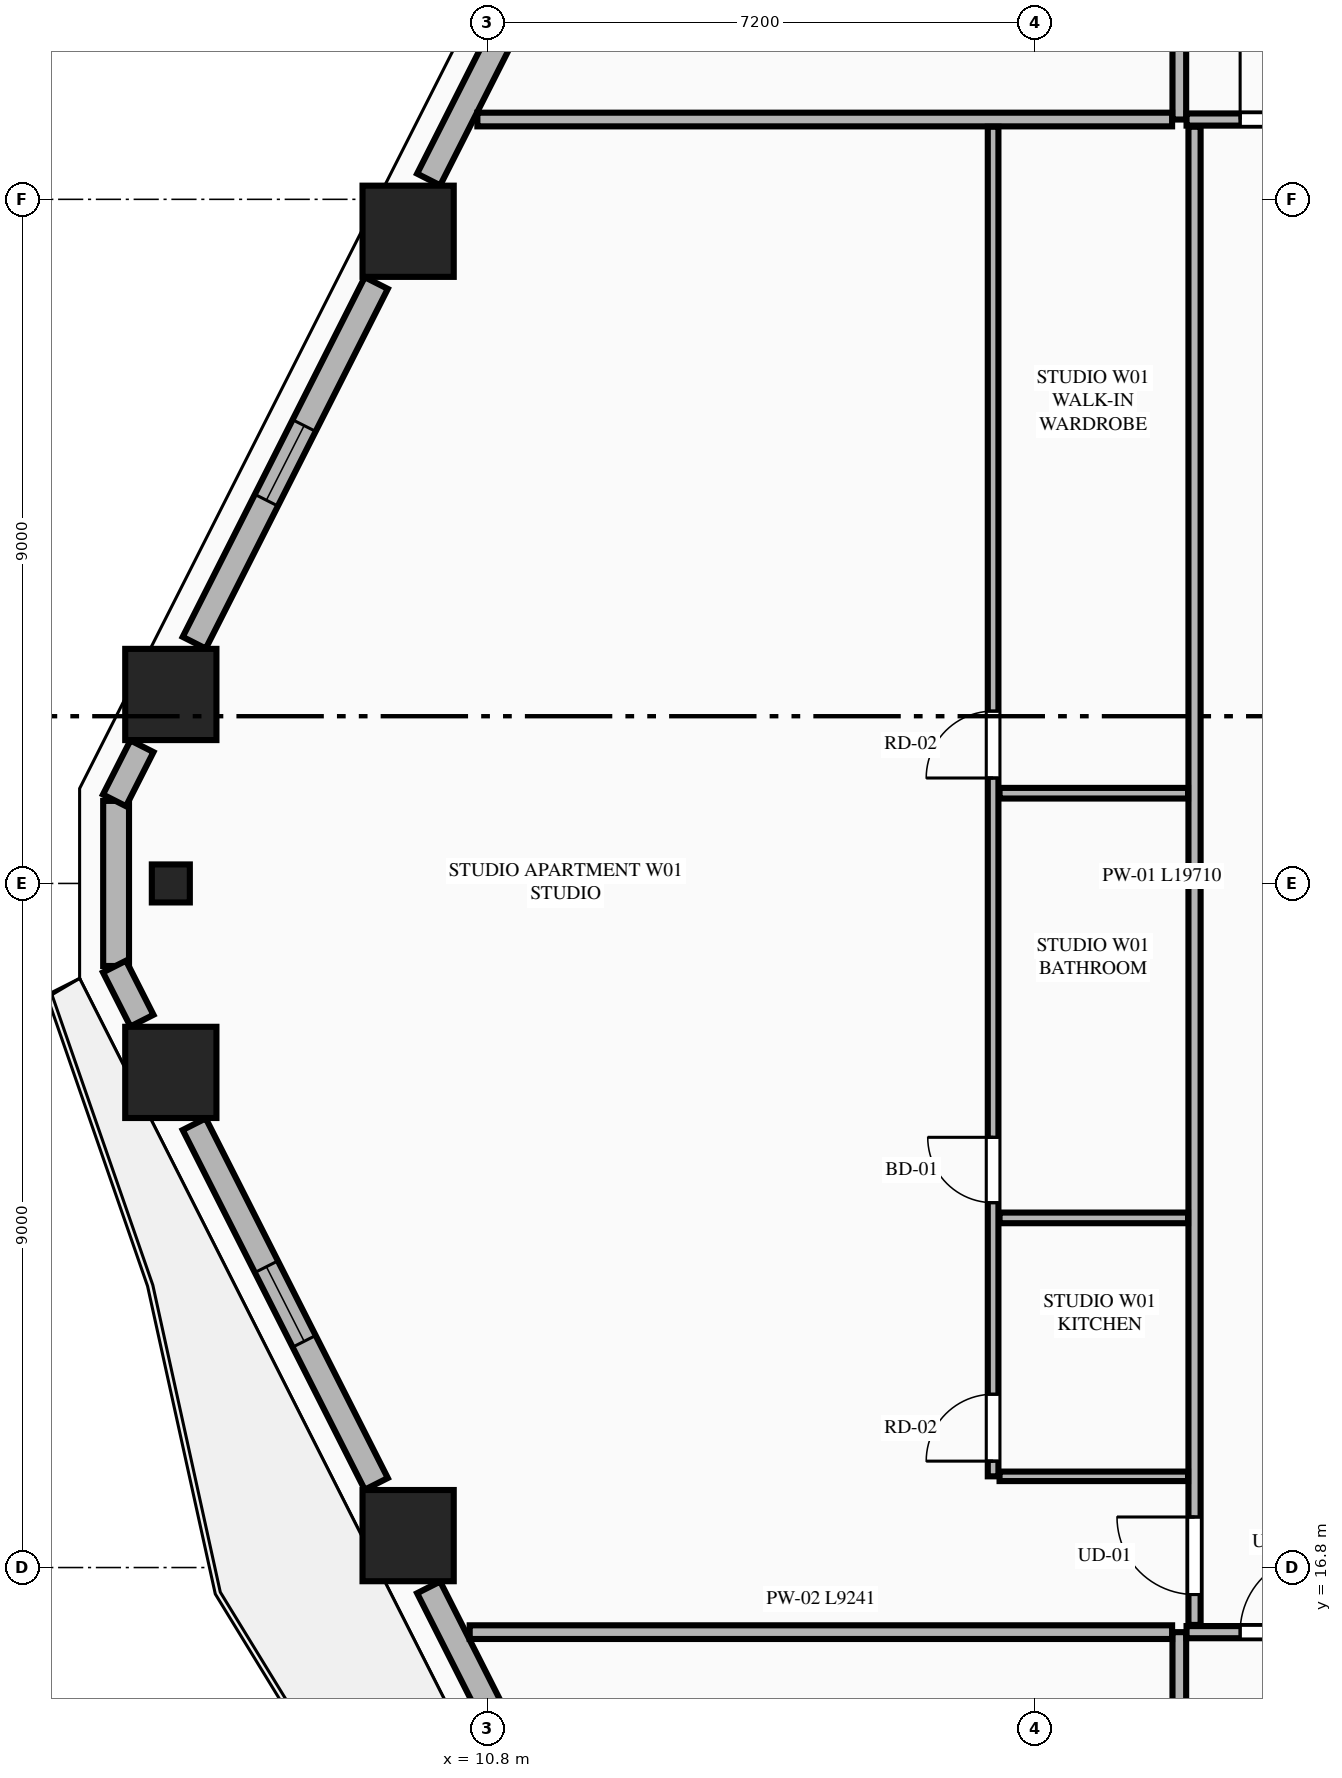
"""IFC4 building model, lengths in metres.
Left out: names, types, materials, properties, quantities, classifications, styles, units other than length and angle.
Written with IfcOpenShell. Run it as: python <this file> out.ifc"""

import sys

from ifc_helpers import new_model, si_unit, direction, frame, frame_2d, origin, origin_2d, place, context, subcontext, project, spatial, rectangle, extrude, element, fill, save


model = new_model("IFC4")
c1 = context("Model", 3, precision=1e-05, world=origin(), true_north=direction((0.0, 1.0)))
c2 = subcontext(c1, "Body", "Model", "MODEL_VIEW")
j1 = project(units=[si_unit("LENGTHUNIT", "METRE"), si_unit("PLANEANGLEUNIT", "RADIAN")], contexts=[c1])
p1 = place(None, origin())
s1 = spatial("IfcSite", under=j1, at=p1, CompositionType="ELEMENT")
p2 = place(p1, origin())
s2 = spatial("IfcBuilding", under=s1, at=p2, CompositionType="ELEMENT")
p3 = place(p2, frame((0.0, 0.0, 63.95)))
s3 = spatial("IfcBuildingStorey", under=s2, at=p3, CompositionType="ELEMENT", Elevation=63.95)
for number, where, z_axis, x_axis in (
    (1, (9.754, 34.38, 0.0), (0.0, 0.0, 1.0), (1.0, 0.0, 0.0)),
    (2, (6.632, 28.286, 0.0), (0.0, 0.0, 1.0), (1.0, 0.0, 0.0)),
    (3, (6.632, 23.314, 0.0), (0.0, 0.0, 1.0), (1.0, 0.0, 0.0)),
    (4, (9.754, 17.22, 0.0), (0.0, 0.0, 1.0), (1.0, 0.0, 0.0)),
):
    element("IfcColumn", number, at=place(p3, frame(where, z_axis=z_axis, x_axis=x_axis)), inside=s3, PredefinedType="COLUMN", context=c2, shape_type="SweptSolid", body=[
        extrude(rectangle(XDim=1.2, YDim=1.2, at=origin_2d()), origin(), (0.0, 0.0, 1.0), 3.55),
    ])
p4 = place(p3, frame((6.632, 25.8, 0.0), z_axis=(0.0, 0.0, 1.0), x_axis=(0.0, -1.0, 0.0)))
e5 = element("IfcColumn", 5, at=p4, inside=s3, PredefinedType="PILASTER", context=c2, shape_type="SweptSolid", body=[
    extrude(rectangle(XDim=0.5, YDim=0.35, at=origin_2d()), origin(), (0.0, 0.0, 1.0), 3.55),
])
p5 = place(p3, frame((5.912, 26.886, 0.0), z_axis=(0.0, 0.0, 1.0), x_axis=(0.0, -1.0, 0.0)))
e6 = element("IfcWall", 6, at=p5, inside=s3, PredefinedType="STANDARD", context=c2, shape_type="SweptSolid", body=[
    extrude(rectangle(XDim=2.172, YDim=0.34, at=frame_2d((1.086, 0.0))), origin(), (0.0, 0.0, 1.0), 3.33),
])
p6 = place(p3, frame((12.529, 40.01, 0.0), z_axis=(0.0, 0.0, 1.0), x_axis=(-0.451627137896, -0.892206774417, 0.0)))
e7 = element("IfcWall", 7, at=p6, inside=s3, PredefinedType="STANDARD", context=c2, shape_type="SweptSolid", body=[
    extrude(rectangle(XDim=5.547, YDim=0.34, at=frame_2d((2.773, 0.0))), origin(), (0.0, 0.0, 1.0), 2.787),
])
p7 = place(p6, frame((2.223, 0.0, 0.75)))
e8 = element("IfcOpeningElement", 8, at=p7, cuts=e7, PredefinedType="OPENING", context=c2, shape_type="SweptSolid", body=[
    extrude(rectangle(XDim=1.1, YDim=1.887, at=frame_2d((0.55, 0.943))), frame((0.0, 0.18, 0.0), z_axis=(0.0, -1.0, 0.0), x_axis=(1.0, 0.0, 0.0)), (0.0, 0.0, 1.0), 0.36),
])
p8 = place(p3, frame((9.335, 33.699, 0.0), z_axis=(0.0, 0.0, 1.0), x_axis=(-0.451590635984, -0.892225250422, 0.0)))
e9 = element("IfcWall", 9, at=p8, inside=s3, PredefinedType="STANDARD", context=c2, shape_type="SweptSolid", body=[
    extrude(rectangle(XDim=5.303, YDim=0.34, at=frame_2d((2.652, 0.0))), origin(), (0.0, 0.0, 1.0), 2.787),
])
p9 = place(p8, frame((2.102, 0.0, 0.75)))
e10 = element("IfcOpeningElement", 10, at=p9, cuts=e9, PredefinedType="OPENING", context=c2, shape_type="SweptSolid", body=[
    extrude(rectangle(XDim=1.1, YDim=1.887, at=frame_2d((0.55, 0.943))), frame((0.0, 0.18, 0.0), z_axis=(0.0, -1.0, 0.0), x_axis=(1.0, 0.0, 0.0)), (0.0, 0.0, 1.0), 0.36),
])
for number, where, z_axis, x_axis in (
    (11, (6.252, 27.605, 0.0), (0.0, 0.0, 1.0), (-0.452, -0.892, 0.0)),
    (12, (5.891, 24.707, 0.0), (0.0, 0.0, 1.0), (0.452, -0.892, 0.0)),
):
    element("IfcWall", number, at=place(p3, frame(where, z_axis=z_axis, x_axis=x_axis)), inside=s3, PredefinedType="STANDARD", context=c2, shape_type="SweptSolid", body=[
        extrude(rectangle(XDim=0.798, YDim=0.34, at=frame_2d((0.399, 0.0))), origin(), (0.0, 0.0, 1.0), 3.33),
    ])
p10 = place(p3, frame((6.94, 22.633, 0.0), z_axis=(0.0, 0.0, 1.0), x_axis=(0.451572088722, -0.892234637686, 0.0)))
e13 = element("IfcWall", 13, at=p10, inside=s3, PredefinedType="STANDARD", context=c2, shape_type="SweptSolid", body=[
    extrude(rectangle(XDim=5.304, YDim=0.34, at=frame_2d((2.652, 0.0))), origin(), (0.0, 0.0, 1.0), 2.787),
])
p11 = place(p10, frame((2.102, 0.0, 0.75)))
e14 = element("IfcOpeningElement", 14, at=p11, cuts=e13, PredefinedType="OPENING", context=c2, shape_type="SweptSolid", body=[
    extrude(rectangle(XDim=1.1, YDim=1.887, at=frame_2d((0.55, 0.943))), frame((0.0, 0.18, 0.0), z_axis=(0.0, -1.0, 0.0), x_axis=(1.0, 0.0, 0.0)), (0.0, 0.0, 1.0), 0.36),
])
p12 = place(p3, frame((10.024, 16.539, 0.0), z_axis=(0.0, 0.0, 1.0), x_axis=(0.451627137896, -0.892206774417, 0.0)))
e15 = element("IfcWall", 15, at=p12, inside=s3, PredefinedType="STANDARD", context=c2, shape_type="SweptSolid", body=[
    extrude(rectangle(XDim=5.547, YDim=0.34, at=frame_2d((2.773, 0.0))), origin(), (0.0, 0.0, 1.0), 2.787),
])
p13 = place(p12, frame((2.679, 0.0, 0.0)))
e16 = element("IfcOpeningElement", 16, at=p13, cuts=e15, PredefinedType="OPENING", context=c2, shape_type="SweptSolid", body=[
    extrude(rectangle(XDim=1.1, YDim=2.25, at=frame_2d((0.55, 1.125))), frame((0.0, 0.18, 0.0), z_axis=(0.0, -1.0, 0.0), x_axis=(1.0, 0.0, 0.0)), (0.0, 0.0, 1.0), 0.36),
])
p14 = place(p3, frame((19.9, 2.455, 0.0), z_axis=(0.0, 0.0, 1.0), x_axis=(0.0, 1.0, 0.0)))
e17 = element("IfcWall", 17, at=p14, inside=s3, PredefinedType="PARTITIONING", context=c2, shape_type="SweptSolid", body=[
    extrude(rectangle(XDim=13.495, YDim=0.18, at=frame_2d((6.748, 0.0))), origin(), (0.0, 0.0, 1.0), 3.33),
])
p15 = place(p3, frame((19.995, 15.95, 0.0), z_axis=(0.0, 0.0, 1.0), x_axis=(1.0, 0.0, 0.0)))
e18 = element("IfcWall", 18, at=p15, inside=s3, PredefinedType="PARTITIONING", context=c2, shape_type="SweptSolid", body=[
    extrude(rectangle(XDim=8.188, YDim=0.16, at=frame_2d((4.094, 0.0))), origin(), (0.0, 0.0, 1.0), 3.33),
])
p16 = place(p15, frame((0.705, 0.0, 0.0)))
e19 = element("IfcOpeningElement", 19, at=p16, cuts=e18, PredefinedType="OPENING", context=c2, shape_type="SweptSolid", body=[
    extrude(rectangle(XDim=1.02, YDim=2.25, at=frame_2d((0.51, 1.125))), frame((0.0, 0.09, 0.0), z_axis=(0.0, -1.0, 0.0), x_axis=(1.0, 0.0, 0.0)), (0.0, 0.0, 1.0), 0.18),
])
p17 = place(p3, frame((19.9, 35.85, 0.0), z_axis=(0.0, 0.0, 1.0), x_axis=(0.0, 1.0, 0.0)))
e20 = element("IfcWall", 20, at=p17, inside=s3, PredefinedType="PARTITIONING", context=c2, shape_type="SweptSolid", body=[
    extrude(rectangle(XDim=13.295, YDim=0.18, at=frame_2d((6.647, 0.0))), origin(), (0.0, 0.0, 1.0), 3.33),
])
p18 = place(p3, frame((19.995, 35.85, 0.0), z_axis=(0.0, 0.0, 1.0), x_axis=(1.0, 0.0, 0.0)))
e21 = element("IfcWall", 21, at=p18, inside=s3, PredefinedType="PARTITIONING", context=c2, shape_type="SweptSolid", body=[
    extrude(rectangle(XDim=8.188, YDim=0.16, at=frame_2d((4.094, 0.0))), origin(), (0.0, 0.0, 1.0), 3.33),
])
p19 = place(p18, frame((0.705, 0.0, 0.0)))
e22 = element("IfcOpeningElement", 22, at=p19, cuts=e21, PredefinedType="OPENING", context=c2, shape_type="SweptSolid", body=[
    extrude(rectangle(XDim=1.02, YDim=2.25, at=frame_2d((0.51, 1.125))), frame((0.0, 0.09, 0.0), z_axis=(0.0, -1.0, 0.0), x_axis=(1.0, 0.0, 0.0)), (0.0, 0.0, 1.0), 0.18),
])
p20 = place(p3, frame((10.564, 15.95, 0.0), z_axis=(0.0, 0.0, 1.0), x_axis=(1.0, 0.0, 0.0)))
e23 = element("IfcWall", 23, at=p20, inside=s3, PredefinedType="PARTITIONING", context=c2, shape_type="SweptSolid", body=[
    extrude(rectangle(XDim=9.241, YDim=0.18, at=frame_2d((4.621, 0.0))), origin(), (0.0, 0.0, 1.0), 3.33),
])
p21 = place(p3, frame((10.665, 35.85, 0.0), z_axis=(0.0, 0.0, 1.0), x_axis=(1.0, 0.0, 0.0)))
e24 = element("IfcWall", 24, at=p21, inside=s3, PredefinedType="PARTITIONING", context=c2, shape_type="SweptSolid", body=[
    extrude(rectangle(XDim=9.14, YDim=0.18, at=frame_2d((4.57, 0.0))), origin(), (0.0, 0.0, 1.0), 3.33),
])
p22 = place(p3, frame((20.1, 16.045, 0.0), z_axis=(0.0, 0.0, 1.0), x_axis=(0.0, 1.0, 0.0)))
e25 = element("IfcWall", 25, at=p22, inside=s3, PredefinedType="PARTITIONING", context=c2, shape_type="SweptSolid", body=[
    extrude(rectangle(XDim=19.71, YDim=0.16, at=frame_2d((9.855, 0.0))), origin(), (0.0, 0.0, 1.0), 2.7),
])
p23 = place(p22, frame((0.4, 0.0, 0.0)))
e26 = element("IfcOpeningElement", 26, at=p23, cuts=e25, PredefinedType="OPENING", context=c2, shape_type="SweptSolid", body=[
    extrude(rectangle(XDim=1.02, YDim=2.25, at=frame_2d((0.51, 1.125))), frame((0.0, 0.09, 0.0), z_axis=(0.0, -1.0, 0.0), x_axis=(1.0, 0.0, 0.0)), (0.0, 0.0, 1.0), 0.18),
])
p24 = place(p3, frame((17.535, 18.0, 0.0), z_axis=(0.0, 0.0, 1.0), x_axis=(1.0, 0.0, 0.0)))
e27 = element("IfcWall", 27, at=p24, inside=s3, PredefinedType="PARTITIONING", context=c2, shape_type="SweptSolid", body=[
    extrude(rectangle(XDim=2.48, YDim=0.125, at=frame_2d((1.24, 0.0))), origin(), (0.0, 0.0, 1.0), 2.7),
])
p25 = place(p3, frame((17.45, 18.0, 0.0), z_axis=(0.0, 0.0, 1.0), x_axis=(0.0, 1.0, 0.0)))
e28 = element("IfcWall", 28, at=p25, inside=s3, PredefinedType="PLUMBINGWALL", context=c2, shape_type="SweptSolid", body=[
    extrude(rectangle(XDim=17.755, YDim=0.14, at=frame_2d((8.877, 0.0))), origin(), (0.0, 0.0, 1.0), 3.33),
])
p26 = place(p25, frame((3.6, 0.0, 0.0)))
e29 = element("IfcOpeningElement", 29, at=p26, cuts=e28, PredefinedType="OPENING", context=c2, shape_type="SweptSolid", body=[
    extrude(rectangle(XDim=0.86, YDim=2.1, at=frame_2d((0.43, 1.05))), frame((0.0, 0.08, 0.0), z_axis=(0.0, -1.0, 0.0), x_axis=(1.0, 0.0, 0.0)), (0.0, 0.0, 1.0), 0.16),
])
p27 = place(p25, frame((9.187, 0.0, 0.0)))
e30 = element("IfcOpeningElement", 30, at=p27, cuts=e28, PredefinedType="OPENING", context=c2, shape_type="SweptSolid", body=[
    extrude(rectangle(XDim=0.88, YDim=2.15, at=frame_2d((0.44, 1.075))), frame((0.0, 0.08, 0.0), z_axis=(0.0, -1.0, 0.0), x_axis=(1.0, 0.0, 0.0)), (0.0, 0.0, 1.0), 0.16),
])
p28 = place(p25, frame((0.2, 0.0, 0.0)))
e31 = element("IfcOpeningElement", 31, at=p28, cuts=e28, PredefinedType="OPENING", context=c2, shape_type="SweptSolid", body=[
    extrude(rectangle(XDim=0.88, YDim=2.15, at=frame_2d((0.44, 1.075))), frame((0.0, 0.08, 0.0), z_axis=(0.0, -1.0, 0.0), x_axis=(1.0, 0.0, 0.0)), (0.0, 0.0, 1.0), 0.16),
])
for number, where, z_axis, x_axis in (
    (32, (17.535, 21.4, 0.0), (0.0, 0.0, 1.0), (1.0, 0.0, 0.0)),
    (33, (17.535, 26.987, 0.0), (0.0, 0.0, 1.0), (1.0, 0.0, 0.0)),
):
    element("IfcWall", number, at=place(p3, frame(where, z_axis=z_axis, x_axis=x_axis)), inside=s3, PredefinedType="PLUMBINGWALL", context=c2, shape_type="SweptSolid", body=[
        extrude(rectangle(XDim=2.48, YDim=0.14, at=frame_2d((1.24, 0.0))), origin(), (0.0, 0.0, 1.0), 3.33),
    ])
p29 = place(p9, origin())
e34 = element("IfcWindow", 34, at=p29, inside=s3, PartitioningType="SINGLE_PANEL", PredefinedType="WINDOW", context=c2, shape_type="SweptSolid", body=[
    extrude(rectangle(XDim=1.1, YDim=1.887, at=frame_2d((0.55, 0.943))), frame((0.0, 0.03, 0.0), z_axis=(0.0, -1.0, 0.0), x_axis=(1.0, 0.0, 0.0)), (0.0, 0.0, 1.0), 0.06),
])
fill(e10, e34)
p30 = place(p11, origin())
e35 = element("IfcWindow", 35, at=p30, inside=s3, PartitioningType="SINGLE_PANEL", PredefinedType="WINDOW", context=c2, shape_type="SweptSolid", body=[
    extrude(rectangle(XDim=1.1, YDim=1.887, at=frame_2d((0.55, 0.943))), frame((0.0, 0.03, 0.0), z_axis=(0.0, -1.0, 0.0), x_axis=(1.0, 0.0, 0.0)), (0.0, 0.0, 1.0), 0.06),
])
fill(e14, e35)
p31 = place(p16, origin())
e36 = element("IfcDoor", 36, at=p31, inside=s3, OperationType="SINGLE_SWING_RIGHT", PredefinedType="DOOR", context=c2, shape_type="SweptSolid", body=[
    extrude(rectangle(XDim=1.02, YDim=2.25, at=frame_2d((0.51, 1.125))), frame((0.0, 0.025, 0.0), z_axis=(0.0, -1.0, 0.0), x_axis=(1.0, 0.0, 0.0)), (0.0, 0.0, 1.0), 0.05),
])
fill(e19, e36)
p32 = place(p19, origin())
e37 = element("IfcDoor", 37, at=p32, inside=s3, OperationType="SINGLE_SWING_LEFT", PredefinedType="DOOR", context=c2, shape_type="SweptSolid", body=[
    extrude(rectangle(XDim=1.02, YDim=2.25, at=frame_2d((0.51, 1.125))), frame((0.0, 0.025, 0.0), z_axis=(0.0, -1.0, 0.0), x_axis=(1.0, 0.0, 0.0)), (0.0, 0.0, 1.0), 0.05),
])
fill(e22, e37)
p33 = place(p26, origin())
e38 = element("IfcDoor", 38, at=p33, inside=s3, OperationType="SINGLE_SWING_RIGHT", PredefinedType="DOOR", context=c2, shape_type="SweptSolid", body=[
    extrude(rectangle(XDim=0.86, YDim=2.1, at=frame_2d((0.43, 1.05))), frame((0.0, 0.025, 0.0), z_axis=(0.0, -1.0, 0.0), x_axis=(1.0, 0.0, 0.0)), (0.0, 0.0, 1.0), 0.05),
])
fill(e29, e38)
p34 = place(p27, origin())
e39 = element("IfcDoor", 39, at=p34, inside=s3, OperationType="SINGLE_SWING_LEFT", PredefinedType="DOOR", context=c2, shape_type="SweptSolid", body=[
    extrude(rectangle(XDim=0.88, YDim=2.15, at=frame_2d((0.44, 1.075))), frame((0.0, 0.025, 0.0), z_axis=(0.0, -1.0, 0.0), x_axis=(1.0, 0.0, 0.0)), (0.0, 0.0, 1.0), 0.05),
])
fill(e30, e39)
p35 = place(p23, origin())
e40 = element("IfcDoor", 40, at=p35, inside=s3, OperationType="SINGLE_SWING_RIGHT", PredefinedType="DOOR", context=c2, shape_type="SweptSolid", body=[
    extrude(rectangle(XDim=1.02, YDim=2.25, at=frame_2d((0.51, 1.125))), frame((0.0, 0.025, 0.0), z_axis=(0.0, -1.0, 0.0), x_axis=(1.0, 0.0, 0.0)), (0.0, 0.0, 1.0), 0.05),
])
fill(e26, e40)
p36 = place(p28, origin())
e41 = element("IfcDoor", 41, at=p36, inside=s3, OperationType="SINGLE_SWING_LEFT", PredefinedType="DOOR", context=c2, shape_type="SweptSolid", body=[
    extrude(rectangle(XDim=0.88, YDim=2.15, at=frame_2d((0.44, 1.075))), frame((0.0, 0.025, 0.0), z_axis=(0.0, -1.0, 0.0), x_axis=(1.0, 0.0, 0.0)), (0.0, 0.0, 1.0), 0.05),
])
fill(e31, e41)
save(model, sys.argv[1])
